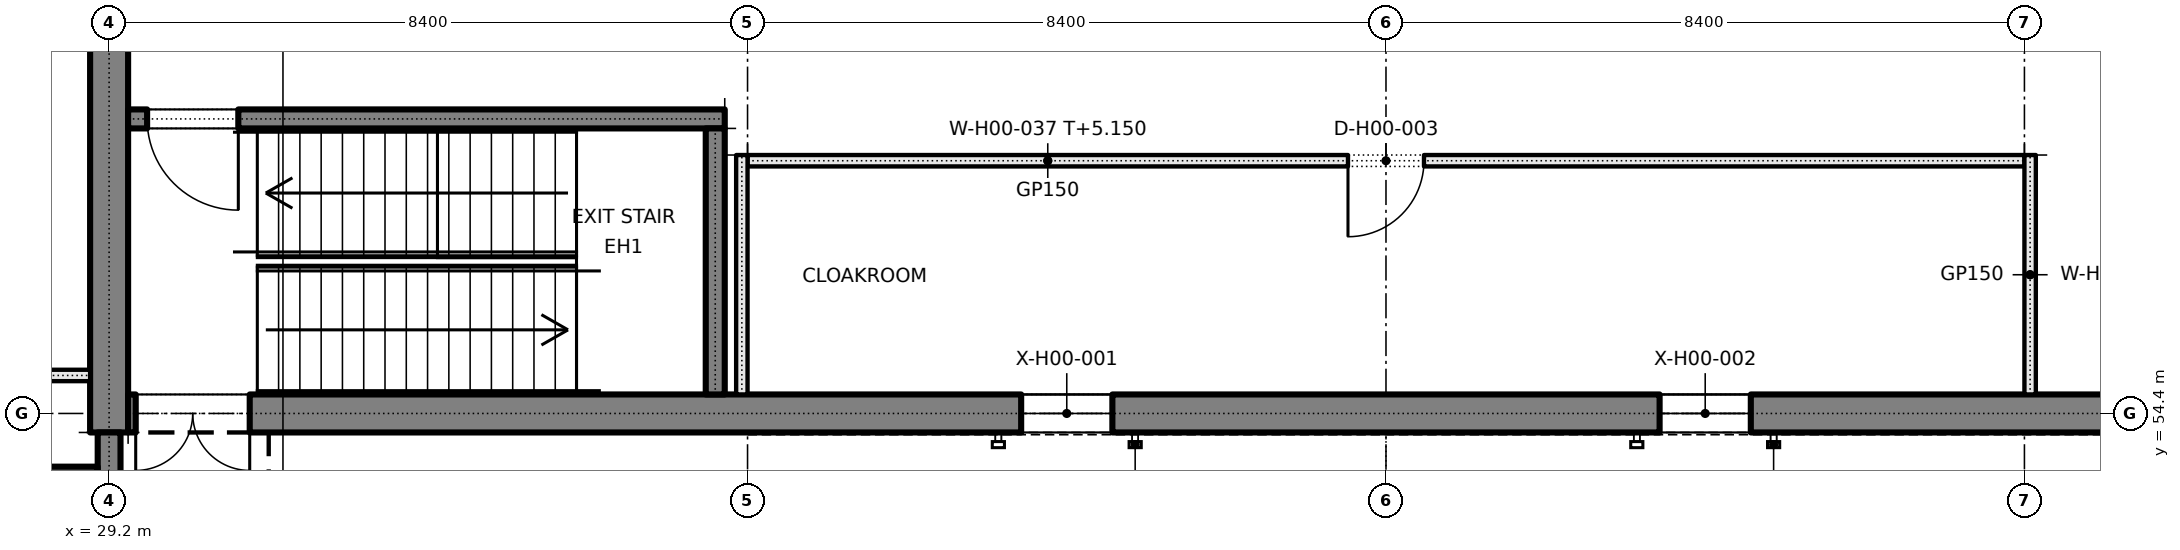
"""IFC4 building model, lengths in metres.
Left out: names, types, materials, properties, quantities, classifications, styles, units other than length and angle.
Written with IfcOpenShell. Run it as: python <this file> out.ifc"""

import sys

from ifc_helpers import new_model, si_unit, direction, frame, frame_2d, origin, place, context, subcontext, project, spatial, rectangle, extrude, element, fill, save


model = new_model("IFC4")
c1 = context("Model", 3, precision=1e-05, world=origin(), true_north=direction((0.0, 1.0)))
c2 = subcontext(c1, "Body", "Model", "MODEL_VIEW")
j1 = project(units=[si_unit("LENGTHUNIT", "METRE"), si_unit("PLANEANGLEUNIT", "RADIAN")], contexts=[c1])
p1 = place(None, origin())
s1 = spatial("IfcSite", under=j1, at=p1, CompositionType="ELEMENT")
p2 = place(p1, origin())
s2 = spatial("IfcBuilding", under=s1, at=p2, CompositionType="ELEMENT")
p3 = place(p2, origin())
s3 = spatial("IfcBuildingStorey", under=s2, at=p3, CompositionType="ELEMENT", Elevation=0.0)
p4 = place(p3, frame((29.2, 54.15, 0.0), z_axis=(0.0, 0.0, 1.0), x_axis=(0.0, 1.0, 0.0)))
e1 = element("IfcWall", 1, at=p4, inside=s3, PredefinedType="SOLIDWALL", context=c2, shape_type="SweptSolid", body=[
    extrude(rectangle(XDim=42.5, YDim=0.5, at=frame_2d((21.25, 0.0))), origin(), (0.0, 0.0, 1.0), 5.4),
])
p5 = place(p4, frame((7.75, 0.0, 0.0)))
e2 = element("IfcOpeningElement", 2, at=p5, cuts=e1, PredefinedType="OPENING", context=c2, shape_type="SweptSolid", body=[
    extrude(rectangle(XDim=1.8, YDim=2.1, at=frame_2d((0.9, 1.05))), frame((0.0, 0.26, 0.0), z_axis=(0.0, -1.0, 0.0), x_axis=(1.0, 0.0, 0.0)), (0.0, 0.0, 1.0), 0.52),
])
p6 = place(p4, frame((20.35, 0.0, 0.0)))
e3 = element("IfcOpeningElement", 3, at=p6, cuts=e1, PredefinedType="OPENING", context=c2, shape_type="SweptSolid", body=[
    extrude(rectangle(XDim=1.8, YDim=2.1, at=frame_2d((0.9, 1.05))), frame((0.0, 0.26, 0.0), z_axis=(0.0, -1.0, 0.0), x_axis=(1.0, 0.0, 0.0)), (0.0, 0.0, 1.0), 0.52),
])
p7 = place(p4, frame((32.95, 0.0, 0.0)))
e4 = element("IfcOpeningElement", 4, at=p7, cuts=e1, PredefinedType="OPENING", context=c2, shape_type="SweptSolid", body=[
    extrude(rectangle(XDim=1.8, YDim=2.1, at=frame_2d((0.9, 1.05))), frame((0.0, 0.26, 0.0), z_axis=(0.0, -1.0, 0.0), x_axis=(1.0, 0.0, 0.0)), (0.0, 0.0, 1.0), 0.52),
])
p8 = place(p3, frame((29.45, 54.4, 0.0), z_axis=(0.0, 0.0, 1.0), x_axis=(1.0, 0.0, 0.0)))
e5 = element("IfcWall", 5, at=p8, inside=s3, PredefinedType="SOLIDWALL", context=c2, shape_type="SweptSolid", body=[
    extrude(rectangle(XDim=66.7, YDim=0.5, at=frame_2d((33.35, 0.0))), origin(), (0.0, 0.0, 1.0), 5.4),
])
p9 = place(p8, frame((11.75, 0.0, 0.9)))
e6 = element("IfcOpeningElement", 6, at=p9, cuts=e5, PredefinedType="OPENING", context=c2, shape_type="SweptSolid", body=[
    extrude(rectangle(XDim=1.2, YDim=3.6, at=frame_2d((0.6, 1.8))), frame((0.0, 0.26, 0.0), z_axis=(0.0, -1.0, 0.0), x_axis=(1.0, 0.0, 0.0)), (0.0, 0.0, 1.0), 0.52),
])
p10 = place(p8, frame((20.15, 0.0, 0.9)))
e7 = element("IfcOpeningElement", 7, at=p10, cuts=e5, PredefinedType="OPENING", context=c2, shape_type="SweptSolid", body=[
    extrude(rectangle(XDim=1.2, YDim=3.6, at=frame_2d((0.6, 1.8))), frame((0.0, 0.26, 0.0), z_axis=(0.0, -1.0, 0.0), x_axis=(1.0, 0.0, 0.0)), (0.0, 0.0, 1.0), 0.52),
])
p11 = place(p8, frame((28.55, 0.0, 0.9)))
e8 = element("IfcOpeningElement", 8, at=p11, cuts=e5, PredefinedType="OPENING", context=c2, shape_type="SweptSolid", body=[
    extrude(rectangle(XDim=1.2, YDim=3.6, at=frame_2d((0.6, 1.8))), frame((0.0, 0.26, 0.0), z_axis=(0.0, -1.0, 0.0), x_axis=(1.0, 0.0, 0.0)), (0.0, 0.0, 1.0), 0.52),
])
p12 = place(p8, frame((36.95, 0.0, 0.9)))
e9 = element("IfcOpeningElement", 9, at=p12, cuts=e5, PredefinedType="OPENING", context=c2, shape_type="SweptSolid", body=[
    extrude(rectangle(XDim=1.2, YDim=3.6, at=frame_2d((0.6, 1.8))), frame((0.0, 0.26, 0.0), z_axis=(0.0, -1.0, 0.0), x_axis=(1.0, 0.0, 0.0)), (0.0, 0.0, 1.0), 0.52),
])
p13 = place(p8, frame((45.35, 0.0, 0.9)))
e10 = element("IfcOpeningElement", 10, at=p13, cuts=e5, PredefinedType="OPENING", context=c2, shape_type="SweptSolid", body=[
    extrude(rectangle(XDim=1.2, YDim=3.6, at=frame_2d((0.6, 1.8))), frame((0.0, 0.26, 0.0), z_axis=(0.0, -1.0, 0.0), x_axis=(1.0, 0.0, 0.0)), (0.0, 0.0, 1.0), 0.52),
])
p14 = place(p8, frame((53.75, 0.0, 0.9)))
e11 = element("IfcOpeningElement", 11, at=p14, cuts=e5, PredefinedType="OPENING", context=c2, shape_type="SweptSolid", body=[
    extrude(rectangle(XDim=1.2, YDim=3.6, at=frame_2d((0.6, 1.8))), frame((0.0, 0.26, 0.0), z_axis=(0.0, -1.0, 0.0), x_axis=(1.0, 0.0, 0.0)), (0.0, 0.0, 1.0), 0.52),
])
p15 = place(p8, frame((0.1, 0.0, 0.0)))
e12 = element("IfcOpeningElement", 12, at=p15, cuts=e5, PredefinedType="OPENING", context=c2, shape_type="SweptSolid", body=[
    extrude(rectangle(XDim=1.5, YDim=2.1, at=frame_2d((0.75, 1.05))), frame((0.0, 0.26, 0.0), z_axis=(0.0, -1.0, 0.0), x_axis=(1.0, 0.0, 0.0)), (0.0, 0.0, 1.0), 0.52),
])
p16 = place(p8, frame((59.2, 0.0, 0.0)))
e13 = element("IfcOpeningElement", 13, at=p16, cuts=e5, PredefinedType="OPENING", context=c2, shape_type="SweptSolid", body=[
    extrude(rectangle(XDim=1.5, YDim=2.1, at=frame_2d((0.75, 1.05))), frame((0.0, 0.26, 0.0), z_axis=(0.0, -1.0, 0.0), x_axis=(1.0, 0.0, 0.0)), (0.0, 0.0, 1.0), 0.52),
])
p17 = place(p3, frame((29.45, 58.275, 0.0), z_axis=(0.0, 0.0, 1.0), x_axis=(1.0, 0.0, 0.0)))
e14 = element("IfcWall", 14, at=p17, inside=s3, PredefinedType="SOLIDWALL", context=c2, shape_type="SweptSolid", body=[
    extrude(rectangle(XDim=7.85, YDim=0.25, at=frame_2d((3.925, 0.0))), origin(), (0.0, 0.0, 1.0), 5.4),
])
p18 = place(p17, frame((0.25, 0.0, 0.0)))
e15 = element("IfcOpeningElement", 15, at=p18, cuts=e14, PredefinedType="OPENING", context=c2, shape_type="SweptSolid", body=[
    extrude(rectangle(XDim=1.2, YDim=2.1, at=frame_2d((0.6, 1.05))), frame((0.0, 0.135, 0.0), z_axis=(0.0, -1.0, 0.0), x_axis=(1.0, 0.0, 0.0)), (0.0, 0.0, 1.0), 0.27),
])
p19 = place(p3, frame((37.175, 54.65, 0.0), z_axis=(0.0, 0.0, 1.0), x_axis=(0.0, 1.0, 0.0)))
e16 = element("IfcWall", 16, at=p19, inside=s3, PredefinedType="SOLIDWALL", context=c2, shape_type="SweptSolid", body=[
    extrude(rectangle(XDim=3.5, YDim=0.25, at=frame_2d((1.75, 0.0))), origin(), (0.0, 0.0, 1.0), 5.4),
])
p20 = place(p3, frame((29.2, 54.17, -0.3), z_axis=(0.0, 0.0, 1.0), x_axis=(0.0, 1.0, 0.0)))
e17 = element("IfcWall", 17, at=p20, inside=s3, PredefinedType="SOLIDWALL", context=c2, shape_type="SweptSolid", body=[
    extrude(rectangle(XDim=42.46, YDim=0.5, at=frame_2d((21.23, 0.0))), origin(), (0.0, 0.0, 1.0), 0.3),
])
p21 = place(p3, frame((29.45, 54.4, -0.5), z_axis=(0.0, 0.0, 1.0), x_axis=(1.0, 0.0, 0.0)))
e18 = element("IfcWall", 18, at=p21, inside=s3, PredefinedType="SOLIDWALL", context=c2, shape_type="SweptSolid", body=[
    extrude(rectangle(XDim=66.7, YDim=0.5, at=frame_2d((33.35, 0.0))), origin(), (0.0, 0.0, 1.0), 0.5),
])
p22 = place(p3, frame((29.45, 58.275, -0.5), z_axis=(0.0, 0.0, 1.0), x_axis=(1.0, 0.0, 0.0)))
e19 = element("IfcWall", 19, at=p22, inside=s3, PredefinedType="SOLIDWALL", context=c2, shape_type="SweptSolid", body=[
    extrude(rectangle(XDim=7.83, YDim=0.25, at=frame_2d((3.915, 0.0))), origin(), (0.0, 0.0, 1.0), 0.5),
])
p23 = place(p3, frame((37.175, 57.455, -0.5), z_axis=(0.0, 0.0, 1.0), x_axis=(0.0, 1.0, 0.0)))
e20 = element("IfcWall", 20, at=p23, inside=s3, PredefinedType="SOLIDWALL", context=c2, shape_type="SweptSolid", body=[
    extrude(rectangle(XDim=0.695, YDim=0.25, at=frame_2d((0.347, 0.0))), origin(), (0.0, 0.0, 1.0), 0.5),
])
p24 = place(p3, frame((37.175, 54.65, -0.5), z_axis=(0.0, 0.0, 1.0), x_axis=(0.0, 1.0, 0.0)))
e21 = element("IfcWall", 21, at=p24, inside=s3, PredefinedType="SOLIDWALL", context=c2, shape_type="SweptSolid", body=[
    extrude(rectangle(XDim=2.805, YDim=0.25, at=frame_2d((1.403, 0.0))), origin(), (0.0, 0.0, 1.0), 0.5),
])
p25 = place(p3, frame((29.2, 46.25, 0.0), z_axis=(0.0, 0.0, 1.0), x_axis=(0.0, 1.0, 0.0)))
e22 = element("IfcWall", 22, at=p25, inside=s3, PredefinedType="SOLIDWALL", context=c2, shape_type="SweptSolid", body=[
    extrude(rectangle(XDim=7.9, YDim=0.3, at=frame_2d((3.95, 0.0))), origin(), (0.0, 0.0, 1.0), 5.4),
])
p26 = place(p25, frame((0.3, 0.0, 0.0)))
e23 = element("IfcOpeningElement", 23, at=p26, cuts=e22, PredefinedType="OPENING", context=c2, shape_type="SweptSolid", body=[
    extrude(rectangle(XDim=1.1, YDim=2.1, at=frame_2d((0.55, 1.05))), frame((0.0, 0.16, 0.0), z_axis=(0.0, -1.0, 0.0), x_axis=(1.0, 0.0, 0.0)), (0.0, 0.0, 1.0), 0.32),
])
p27 = place(p3, frame((37.6, 57.725, 0.0), z_axis=(0.0, 0.0, 1.0), x_axis=(1.0, 0.0, 0.0)))
e24 = element("IfcWall", 24, at=p27, inside=s3, PredefinedType="PARTITIONING", context=c2, shape_type="SweptSolid", body=[
    extrude(rectangle(XDim=16.8, YDim=0.15, at=frame_2d((8.4, 0.0))), origin(), (0.0, 0.0, 1.0), 5.15),
])
p28 = place(p27, frame((7.9, 0.0, 0.0)))
e25 = element("IfcOpeningElement", 25, at=p28, cuts=e24, PredefinedType="OPENING", context=c2, shape_type="SweptSolid", body=[
    extrude(rectangle(XDim=1.0, YDim=2.1, at=frame_2d((0.5, 1.05))), frame((0.0, 0.085, 0.0), z_axis=(0.0, -1.0, 0.0), x_axis=(1.0, 0.0, 0.0)), (0.0, 0.0, 1.0), 0.17),
])
p29 = place(p3, frame((37.525, 54.65, 0.0), z_axis=(0.0, 0.0, 1.0), x_axis=(0.0, 1.0, 0.0)))
e26 = element("IfcWall", 26, at=p29, inside=s3, PredefinedType="PARTITIONING", context=c2, shape_type="SweptSolid", body=[
    extrude(rectangle(XDim=3.15, YDim=0.15, at=frame_2d((1.575, 0.0))), origin(), (0.0, 0.0, 1.0), 4.55),
])
p30 = place(p3, frame((54.475, 54.65, 0.0), z_axis=(0.0, 0.0, 1.0), x_axis=(0.0, 1.0, 0.0)))
e27 = element("IfcWall", 27, at=p30, inside=s3, PredefinedType="PARTITIONING", context=c2, shape_type="SweptSolid", body=[
    extrude(rectangle(XDim=3.15, YDim=0.15, at=frame_2d((1.575, 0.0))), origin(), (0.0, 0.0, 1.0), 5.15),
])
p31 = place(p3, frame((25.8, 53.575, 0.0), z_axis=(0.0, 0.0, 1.0), x_axis=(1.0, 0.0, 0.0)))
e28 = element("IfcWall", 28, at=p31, inside=s3, PredefinedType="SHEAR", context=c2, shape_type="SweptSolid", body=[
    extrude(rectangle(XDim=3.25, YDim=0.25, at=frame_2d((1.625, 0.0))), origin(), (0.0, 0.0, 1.0), 5.4),
])
p32 = place(p3, frame((20.075, 54.9, 0.0), z_axis=(0.0, 0.0, 1.0), x_axis=(1.0, 0.0, 0.0)))
e29 = element("IfcWall", 29, at=p32, inside=s3, PredefinedType="PARTITIONING", context=c2, shape_type="SweptSolid", body=[
    extrude(rectangle(XDim=8.875, YDim=0.15, at=frame_2d((4.438, 0.0))), origin(), (0.0, 0.0, 1.0), 5.4),
])
p33 = place(p3, frame((29.2, 47.67, -0.2), z_axis=(0.0, 0.0, 1.0), x_axis=(0.0, 1.0, 0.0)))
e30 = element("IfcWall", 30, at=p33, inside=s3, PredefinedType="SOLIDWALL", context=c2, shape_type="SweptSolid", body=[
    extrude(rectangle(XDim=6.41, YDim=0.3, at=frame_2d((3.205, 0.0))), origin(), (0.0, 0.0, 1.0), 0.2),
])
p34 = place(p9, origin())
e31 = element("IfcWindow", 31, at=p34, inside=s3, PartitioningType="SINGLE_PANEL", PredefinedType="WINDOW", context=c2, shape_type="SweptSolid", body=[
    extrude(rectangle(XDim=1.2, YDim=3.6, at=frame_2d((0.6, 1.8))), frame((0.0, 0.03, 0.0), z_axis=(0.0, -1.0, 0.0), x_axis=(1.0, 0.0, 0.0)), (0.0, 0.0, 1.0), 0.06),
])
fill(e6, e31)
p35 = place(p10, origin())
e32 = element("IfcWindow", 32, at=p35, inside=s3, PartitioningType="SINGLE_PANEL", PredefinedType="WINDOW", context=c2, shape_type="SweptSolid", body=[
    extrude(rectangle(XDim=1.2, YDim=3.6, at=frame_2d((0.6, 1.8))), frame((0.0, 0.03, 0.0), z_axis=(0.0, -1.0, 0.0), x_axis=(1.0, 0.0, 0.0)), (0.0, 0.0, 1.0), 0.06),
])
fill(e7, e32)
p36 = place(p28, frame((1.0, 0.0, 0.0), z_axis=(0.0, 0.0, 1.0), x_axis=(-1.0, 0.0, 0.0)))
e33 = element("IfcDoor", 33, at=p36, inside=s3, OperationType="SINGLE_SWING_RIGHT", PredefinedType="DOOR", context=c2, shape_type="SweptSolid", body=[
    extrude(rectangle(XDim=1.0, YDim=2.1, at=frame_2d((0.5, 1.05))), frame((0.0, 0.025, 0.0), z_axis=(0.0, -1.0, 0.0), x_axis=(1.0, 0.0, 0.0)), (0.0, 0.0, 1.0), 0.05),
])
fill(e25, e33)
p37 = place(p18, frame((1.2, 0.0, 0.0), z_axis=(0.0, 0.0, 1.0), x_axis=(-1.0, 0.0, 0.0)))
e34 = element("IfcDoor", 34, at=p37, inside=s3, OperationType="SINGLE_SWING_LEFT", PredefinedType="DOOR", context=c2, shape_type="SweptSolid", body=[
    extrude(rectangle(XDim=1.2, YDim=2.1, at=frame_2d((0.6, 1.05))), frame((0.0, 0.025, 0.0), z_axis=(0.0, -1.0, 0.0), x_axis=(1.0, 0.0, 0.0)), (0.0, 0.0, 1.0), 0.05),
])
fill(e15, e34)
p38 = place(p15, frame((1.5, 0.0, 0.0), z_axis=(0.0, 0.0, 1.0), x_axis=(-1.0, 0.0, 0.0)))
e35 = element("IfcDoor", 35, at=p38, inside=s3, OperationType="DOUBLE_DOOR_SINGLE_SWING", PredefinedType="DOOR", context=c2, shape_type="SweptSolid", body=[
    extrude(rectangle(XDim=1.5, YDim=2.1, at=frame_2d((0.75, 1.05))), frame((0.0, 0.025, 0.0), z_axis=(0.0, -1.0, 0.0), x_axis=(1.0, 0.0, 0.0)), (0.0, 0.0, 1.0), 0.05),
])
fill(e12, e35)
save(model, sys.argv[1])
